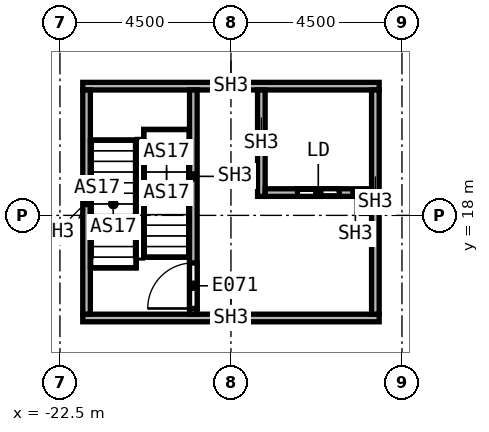
"""IFC4 building model, lengths in metres.
Left out: names, types, materials, properties, quantities, classifications, styles, units other than length and angle.
Written with IfcOpenShell. Run it as: python <this file> out.ifc"""

import sys

from ifc_helpers import new_model, si_unit, direction, frame, frame_2d, origin, place, context, subcontext, project, spatial, rectangle, extrude, element, fill, save


model = new_model("IFC4")
c1 = context("Model", 3, precision=1e-05, world=origin(), true_north=direction((0.0, 1.0)))
c2 = subcontext(c1, "Body", "Model", "MODEL_VIEW")
j1 = project(units=[si_unit("LENGTHUNIT", "METRE"), si_unit("PLANEANGLEUNIT", "RADIAN")], contexts=[c1])
p1 = place(None, origin())
s1 = spatial("IfcSite", under=j1, at=p1, CompositionType="ELEMENT")
p2 = place(p1, origin())
s2 = spatial("IfcBuilding", under=s1, at=p2, CompositionType="ELEMENT")
p3 = place(p2, frame((0.0, 0.0, 52.0)))
s3 = spatial("IfcBuildingStorey", under=s2, at=p3, CompositionType="ELEMENT", Elevation=52.0)
for number, where, z_axis, x_axis in (
    (1, (-21.9, 15.3, 0.0), (0.0, 0.0, 1.0), (1.0, 0.0, 0.0)),
    (2, (-21.9, 21.4, 0.0), (0.0, 0.0, 1.0), (1.0, 0.0, 0.0)),
):
    element("IfcWall", number, at=place(p3, frame(where, z_axis=z_axis, x_axis=x_axis)), inside=s3, PredefinedType="SOLIDWALL", context=c2, shape_type="SweptSolid", body=[
        extrude(rectangle(XDim=7.8, YDim=0.2, at=frame_2d((3.9, 0.0))), origin(), (0.0, 0.0, 1.0), 7.59),
    ])
for number, where, z_axis, x_axis in (
    (3, (-21.8, 15.4, 0.0), (0.0, 0.0, 1.0), (0.0, 1.0, 0.0)),
    (4, (-14.2, 15.4, 0.0), (0.0, 0.0, 1.0), (0.0, 1.0, 0.0)),
):
    element("IfcWall", number, at=place(p3, frame(where, z_axis=z_axis, x_axis=x_axis)), inside=s3, PredefinedType="SOLIDWALL", context=c2, shape_type="SweptSolid", body=[
        extrude(rectangle(XDim=5.9, YDim=0.2, at=frame_2d((2.95, 0.0))), origin(), (0.0, 0.0, 1.0), 7.59),
    ])
p4 = place(p3, frame((-18.99, 15.4, 0.0), z_axis=(0.0, 0.0, 1.0), x_axis=(0.0, 1.0, 0.0)))
e5 = element("IfcWall", 5, at=p4, inside=s3, PredefinedType="SOLIDWALL", context=c2, shape_type="SweptSolid", body=[
    extrude(rectangle(XDim=5.9, YDim=0.2, at=frame_2d((2.95, 0.0))), origin(), (0.0, 0.0, 1.0), 7.59),
])
p5 = place(p4, frame((0.15, 0.0, 0.0)))
e6 = element("IfcOpeningElement", 6, at=p5, cuts=e5, PredefinedType="OPENING", context=c2, shape_type="SweptSolid", body=[
    extrude(rectangle(XDim=1.2, YDim=2.1, at=frame_2d((0.6, 1.05))), frame((0.0, 0.1, 0.0), z_axis=(0.0, -1.0, 0.0), x_axis=(1.0, 0.0, 0.0)), (0.0, 0.0, 1.0), 0.2),
])
p6 = place(p3, frame((-17.2, 18.5, 0.0), z_axis=(0.0, 0.0, 1.0), x_axis=(0.0, 1.0, 0.0)))
e7 = element("IfcWall", 7, at=p6, inside=s3, PredefinedType="SOLIDWALL", context=c2, shape_type="SweptSolid", body=[
    extrude(rectangle(XDim=2.8, YDim=0.2, at=frame_2d((1.4, 0.0))), origin(), (0.0, 0.0, 1.0), 7.59),
])
p7 = place(p3, frame((-17.1, 18.6, 0.0), z_axis=(0.0, 0.0, 1.0), x_axis=(1.0, 0.0, 0.0)))
e8 = element("IfcWall", 8, at=p7, inside=s3, PredefinedType="SOLIDWALL", context=c2, shape_type="SweptSolid", body=[
    extrude(rectangle(XDim=2.8, YDim=0.2, at=frame_2d((1.4, 0.0))), origin(), (0.0, 0.0, 1.0), 7.59),
])
p8 = place(p7, frame((0.85, 0.0, 0.0)))
e9 = element("IfcOpeningElement", 9, at=p8, cuts=e8, PredefinedType="OPENING", context=c2, shape_type="SweptSolid", body=[
    extrude(rectangle(XDim=1.1, YDim=2.1, at=frame_2d((0.55, 1.05))), frame((0.0, 0.1, 0.0), z_axis=(0.0, -1.0, 0.0), x_axis=(1.0, 0.0, 0.0)), (0.0, 0.0, 1.0), 0.2),
])
p9 = place(p5, origin())
e10 = element("IfcDoor", 10, at=p9, inside=s3, OperationType="SINGLE_SWING_LEFT", PredefinedType="DOOR", context=c2, shape_type="SweptSolid", body=[
    extrude(rectangle(XDim=1.2, YDim=2.1, at=frame_2d((0.6, 1.05))), frame((0.0, 0.025, 0.0), z_axis=(0.0, -1.0, 0.0), x_axis=(1.0, 0.0, 0.0)), (0.0, 0.0, 1.0), 0.05),
])
fill(e6, e10)
p10 = place(p8, origin())
e11 = element("IfcDoor", 11, at=p10, inside=s3, OperationType="SLIDING_TO_LEFT", PredefinedType="DOOR", context=c2, shape_type="SweptSolid", body=[
    extrude(rectangle(XDim=1.1, YDim=2.1, at=frame_2d((0.55, 1.05))), frame((0.0, 0.025, 0.0), z_axis=(0.0, -1.0, 0.0), x_axis=(1.0, 0.0, 0.0)), (0.0, 0.0, 1.0), 0.05),
])
fill(e9, e11)
save(model, sys.argv[1])
